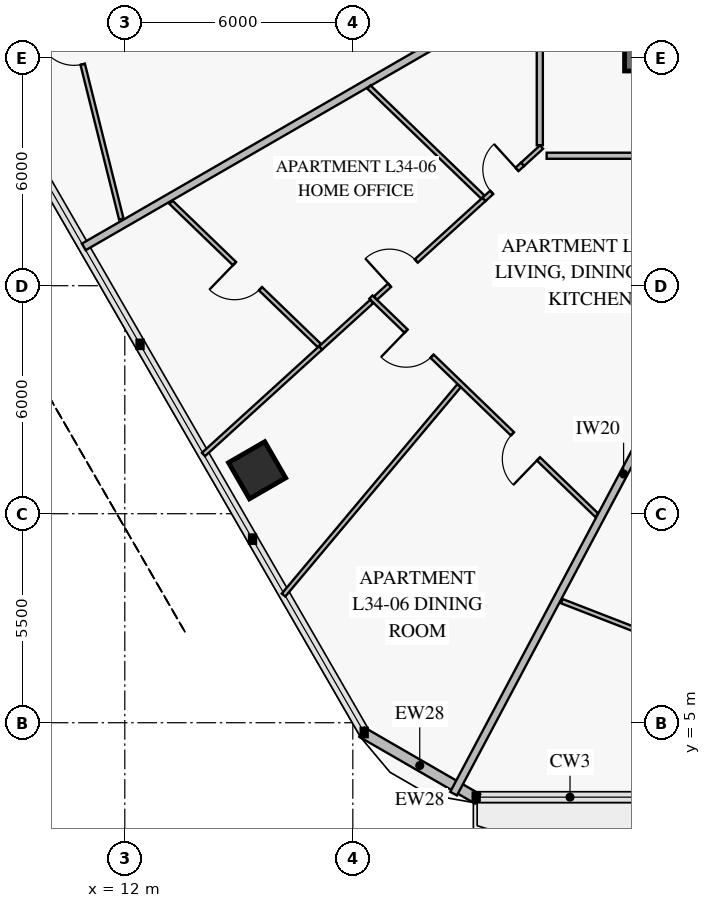
"""IFC4 building model, lengths in metres.
Left out: names, types, materials, properties, quantities, classifications, styles, units other than length and angle.
Written with IfcOpenShell. Run it as: python <this file> out.ifc"""

import sys

from ifc_helpers import new_model, si_unit, direction, frame, frame_2d, origin, origin_2d, place, context, subcontext, project, spatial, rectangle, extrude, element, fill, save


model = new_model("IFC4")
c1 = context("Model", 3, precision=1e-05, world=origin(), true_north=direction((0.0, 1.0)))
c2 = subcontext(c1, "Body", "Model", "MODEL_VIEW")
j1 = project(units=[si_unit("LENGTHUNIT", "METRE"), si_unit("PLANEANGLEUNIT", "RADIAN")], contexts=[c1])
p1 = place(None, origin())
s1 = spatial("IfcSite", under=j1, at=p1, CompositionType="ELEMENT")
p2 = place(p1, origin())
s2 = spatial("IfcBuilding", under=s1, at=p2, CompositionType="ELEMENT")
p3 = place(p2, frame((0.0, 0.0, 138.0)))
s3 = spatial("IfcBuildingStorey", under=s2, at=p3, CompositionType="ELEMENT", Elevation=138.0)
p4 = place(p3, frame((25.15, 22.5, 0.0), z_axis=(0.0, 0.0, 1.0), x_axis=(1.0, 0.0, 0.0)))
e1 = element("IfcWall", 1, at=p4, inside=s3, PredefinedType="SHEAR", context=c2, shape_type="SweptSolid", body=[
    extrude(rectangle(XDim=9.9, YDim=0.7, at=frame_2d((4.95, 0.0))), origin(), (0.0, 0.0, 1.0), 3.8),
])
p5 = place(p4, frame((4.25, 0.0, 0.0)))
e2 = element("IfcOpeningElement", 2, at=p5, cuts=e1, PredefinedType="OPENING", context=c2, shape_type="SweptSolid", body=[
    extrude(rectangle(XDim=1.5, YDim=2.15, at=frame_2d((0.75, 1.075))), frame((0.0, 0.362, 0.0), z_axis=(0.0, -1.0, 0.0), x_axis=(1.0, 0.0, 0.0)), (0.0, 0.0, 1.0), 0.724),
])
p6 = place(p3, frame((15.481, 11.643, 0.0), z_axis=(0.0, 0.0, 1.0), x_axis=(0.5, -0.866025403784, 0.0)))
e3 = element("IfcColumn", 3, at=p6, inside=s3, PredefinedType="COLUMN", context=c2, shape_type="SweptSolid", body=[
    extrude(rectangle(XDim=1.1, YDim=1.1, at=origin_2d()), origin(), (0.0, 0.0, 1.0), 3.55),
])
p7 = place(p3, frame((21.283, 2.994, 0.0), z_axis=(0.0, 0.0, 1.0), x_axis=(-0.866007452331, 0.500031091541, 0.0)))
e4 = element("IfcWall", 4, at=p7, inside=s3, PredefinedType="SOLIDWALL", context=c2, shape_type="SweptSolid", body=[
    extrude(rectangle(XDim=3.515, YDim=0.28, at=frame_2d((1.757, 0.0))), origin(), (0.0, 0.0, 1.0), 3.55),
])
p8 = place(p3, frame((9.688, 27.158, 0.0), z_axis=(0.0, 0.0, 1.0), x_axis=(0.241915844313, -0.970297235011, 0.0)))
e5 = element("IfcWall", 5, at=p8, inside=s3, PredefinedType="PARTITIONING", context=c2, shape_type="SweptSolid", body=[
    extrude(rectangle(XDim=9.177, YDim=0.12, at=frame_2d((4.588, 0.0))), origin(), (0.0, 0.0, 1.0), 2.85),
])
p9 = place(p8, frame((4.029, 0.0, 0.0)))
e6 = element("IfcOpeningElement", 6, at=p9, cuts=e5, PredefinedType="OPENING", context=c2, shape_type="SweptSolid", body=[
    extrude(rectangle(XDim=0.95, YDim=2.1, at=frame_2d((0.475, 1.05))), frame((0.0, 0.072, 0.0), z_axis=(0.0, -1.0, 0.0), x_axis=(1.0, 0.0, 0.0)), (0.0, 0.0, 1.0), 0.144),
])
p10 = place(p3, frame((18.475, 16.2, 0.0), z_axis=(0.0, 0.0, 1.0), x_axis=(0.719335270824, -0.694663060878, 0.0)))
e7 = element("IfcWall", 7, at=p10, inside=s3, PredefinedType="PARTITIONING", context=c2, shape_type="SweptSolid", body=[
    extrude(rectangle(XDim=8.263, YDim=0.12, at=frame_2d((4.131, 0.0))), origin(), (0.0, 0.0, 1.0), 2.85),
])
p11 = place(p10, frame((1.288, 0.0, 0.0)))
e8 = element("IfcOpeningElement", 8, at=p11, cuts=e7, PredefinedType="OPENING", context=c2, shape_type="SweptSolid", body=[
    extrude(rectangle(XDim=0.95, YDim=2.1, at=frame_2d((0.475, 1.05))), frame((0.0, 0.072, 0.0), z_axis=(0.0, -1.0, 0.0), x_axis=(1.0, 0.0, 0.0)), (0.0, 0.0, 1.0), 0.144),
])
p12 = place(p10, frame((5.179, 0.0, 0.0)))
e9 = element("IfcOpeningElement", 9, at=p12, cuts=e7, PredefinedType="OPENING", context=c2, shape_type="SweptSolid", body=[
    extrude(rectangle(XDim=0.95, YDim=2.1, at=frame_2d((0.475, 1.05))), frame((0.0, 0.072, 0.0), z_axis=(0.0, -1.0, 0.0), x_axis=(1.0, 0.0, 0.0)), (0.0, 0.0, 1.0), 0.144),
])
p13 = place(p3, frame((22.469, 19.696, 0.0), z_axis=(0.0, 0.0, 1.0), x_axis=(-0.739835725611, -0.672787558677, 0.0)))
e10 = element("IfcWall", 10, at=p13, inside=s3, PredefinedType="PARTITIONING", context=c2, shape_type="SweptSolid", body=[
    extrude(rectangle(XDim=1.376, YDim=0.12, at=frame_2d((0.688, 0.0))), origin(), (0.0, 0.0, 1.0), 3.55),
])
p14 = place(p13, frame((0.2, 0.0, 0.0)))
e11 = element("IfcOpeningElement", 11, at=p14, cuts=e10, PredefinedType="OPENING", context=c2, shape_type="SweptSolid", body=[
    extrude(rectangle(XDim=0.9, YDim=2.1, at=frame_2d((0.45, 1.05))), frame((0.0, 0.072, 0.0), z_axis=(0.0, -1.0, 0.0), x_axis=(1.0, 0.0, 0.0)), (0.0, 0.0, 1.0), 0.144),
])
p15 = place(p3, frame((21.45, 18.77, 0.0), z_axis=(0.0, 0.0, 1.0), x_axis=(-0.739899959551, -0.672716916583, 0.0)))
e12 = element("IfcWall", 12, at=p15, inside=s3, PredefinedType="PARTITIONING", context=c2, shape_type="SweptSolid", body=[
    extrude(rectangle(XDim=3.856, YDim=0.12, at=frame_2d((1.928, 0.0))), origin(), (0.0, 0.0, 1.0), 3.1),
])
p16 = place(p15, frame((2.406, 0.0, 0.0)))
e13 = element("IfcOpeningElement", 13, at=p16, cuts=e12, PredefinedType="OPENING", context=c2, shape_type="SweptSolid", body=[
    extrude(rectangle(XDim=0.95, YDim=2.1, at=frame_2d((0.475, 1.05))), frame((0.0, 0.072, 0.0), z_axis=(0.0, -1.0, 0.0), x_axis=(1.0, 0.0, 0.0)), (0.0, 0.0, 1.0), 0.144),
])
p17 = place(p3, frame((18.497, 16.084, 0.0), z_axis=(0.0, 0.0, 1.0), x_axis=(-0.739855068129, -0.672766287922, 0.0)))
e14 = element("IfcWall", 14, at=p17, inside=s3, PredefinedType="PARTITIONING", context=c2, shape_type="SweptSolid", body=[
    extrude(rectangle(XDim=1.82, YDim=0.12, at=frame_2d((0.91, 0.0))), origin(), (0.0, 0.0, 1.0), 3.55),
])
p18 = place(p3, frame((13.216, 18.695, 0.0), z_axis=(0.0, 0.0, 1.0), x_axis=(0.71932395173, -0.694674781799, 0.0)))
e15 = element("IfcWall", 15, at=p18, inside=s3, PredefinedType="PARTITIONING", context=c2, shape_type="SweptSolid", body=[
    extrude(rectangle(XDim=5.428, YDim=0.12, at=frame_2d((2.714, 0.0))), origin(), (0.0, 0.0, 1.0), 3.55),
])
p19 = place(p18, frame((2.323, 0.0, 0.0)))
e16 = element("IfcOpeningElement", 16, at=p19, cuts=e15, PredefinedType="OPENING", context=c2, shape_type="SweptSolid", body=[
    extrude(rectangle(XDim=0.95, YDim=2.1, at=frame_2d((0.475, 1.05))), frame((0.0, 0.072, 0.0), z_axis=(0.0, -1.0, 0.0), x_axis=(1.0, 0.0, 0.0)), (0.0, 0.0, 1.0), 0.144),
])
p20 = place(p3, frame((23.1, 19.92, 0.0), z_axis=(0.0, 0.0, 1.0), x_axis=(1.0, 0.0, 0.0)))
e17 = element("IfcWall", 17, at=p20, inside=s3, PredefinedType="PARTITIONING", context=c2, shape_type="SweptSolid", body=[
    extrude(rectangle(XDim=6.318, YDim=0.16, at=frame_2d((3.159, 0.0))), origin(), (0.0, 0.0, 1.0), 2.85),
])
p21 = place(p20, frame((2.634, 0.0, 0.0)))
e18 = element("IfcOpeningElement", 18, at=p21, cuts=e17, PredefinedType="OPENING", context=c2, shape_type="SweptSolid", body=[
    extrude(rectangle(XDim=1.05, YDim=2.15, at=frame_2d((0.525, 1.075))), frame((0.0, 0.092, 0.0), z_axis=(0.0, -1.0, 0.0), x_axis=(1.0, 0.0, 0.0)), (0.0, 0.0, 1.0), 0.184),
])
p22 = place(p3, frame((23.498, 8.199, 0.0), z_axis=(0.0, 0.0, 1.0), x_axis=(0.932323578893, -0.361625143262, 0.0)))
e19 = element("IfcWall", 19, at=p22, inside=s3, PredefinedType="PARTITIONING", context=c2, shape_type="SweptSolid", body=[
    extrude(rectangle(XDim=6.099, YDim=0.12, at=frame_2d((3.05, 0.0))), origin(), (0.0, 0.0, 1.0), 2.85),
])
p23 = place(p22, frame((2.574, 0.0, 0.0)))
e20 = element("IfcOpeningElement", 20, at=p23, cuts=e19, PredefinedType="OPENING", context=c2, shape_type="SweptSolid", body=[
    extrude(rectangle(XDim=0.95, YDim=2.1, at=frame_2d((0.475, 1.05))), frame((0.0, 0.072, 0.0), z_axis=(0.0, -1.0, 0.0), x_axis=(1.0, 0.0, 0.0)), (0.0, 0.0, 1.0), 0.144),
])
p24 = place(p3, frame((22.96, 24.471, 0.0), z_axis=(0.0, 0.0, 1.0), x_axis=(-0.866023267778, -0.500003699654, 0.0)))
e21 = element("IfcWall", 21, at=p24, inside=s3, PredefinedType="PARTITIONING", context=c2, shape_type="SweptSolid", body=[
    extrude(rectangle(XDim=13.901, YDim=0.2, at=frame_2d((6.951, 0.0))), origin(), (0.0, 0.0, 1.0), 2.8),
])
p25 = place(p3, frame((20.794, 13.866, 0.0), z_axis=(0.0, 0.0, 1.0), x_axis=(-0.642520269692, -0.766268688539, 0.0)))
e22 = element("IfcWall", 22, at=p25, inside=s3, PredefinedType="PARTITIONING", context=c2, shape_type="SweptSolid", body=[
    extrude(rectangle(XDim=7.187, YDim=0.12, at=frame_2d((3.594, 0.0))), origin(), (0.0, 0.0, 1.0), 2.8),
])
p26 = place(p3, frame((22.965, 20.147, 0.0), z_axis=(0.0, 0.0, 1.0), x_axis=(-0.739791864243, -0.67283578799, 0.0)))
e23 = element("IfcWall", 23, at=p26, inside=s3, PredefinedType="PARTITIONING", context=c2, shape_type="SweptSolid", body=[
    extrude(rectangle(XDim=0.671, YDim=0.12, at=frame_2d((0.335, 0.0))), origin(), (0.0, 0.0, 1.0), 3.55),
])
p27 = place(p3, frame((17.151, 14.86, 0.0), z_axis=(0.0, 0.0, 1.0), x_axis=(-0.739873749573, -0.672745742976, 0.0)))
e24 = element("IfcWall", 24, at=p27, inside=s3, PredefinedType="PARTITIONING", context=c2, shape_type="SweptSolid", body=[
    extrude(rectangle(XDim=4.164, YDim=0.12, at=frame_2d((2.082, 0.0))), origin(), (0.0, 0.0, 1.0), 2.8),
])
p28 = place(p3, frame((18.424, 21.728, 0.0), z_axis=(0.0, 0.0, 1.0), x_axis=(0.719336822734, -0.694661453845, 0.0)))
e25 = element("IfcWall", 25, at=p28, inside=s3, PredefinedType="PARTITIONING", context=c2, shape_type="SweptSolid", body=[
    extrude(rectangle(XDim=4.166, YDim=0.12, at=frame_2d((2.083, 0.0))), origin(), (0.0, 0.0, 1.0), 3.55),
])
p29 = place(p3, frame((29.598, 19.96, 0.0), z_axis=(0.0, 0.0, 1.0), x_axis=(-0.469467427619, -0.882949791554, 0.0)))
e26 = element("IfcWall", 26, at=p29, inside=s3, PredefinedType="PARTITIONING", context=c2, shape_type="SweptSolid", body=[
    extrude(rectangle(XDim=19.057, YDim=0.2, at=frame_2d((9.528, 0.0))), origin(), (0.0, 0.0, 1.0), 2.8),
])
p30 = place(p3, frame((22.92, 24.272, 0.0), z_axis=(0.0, 0.0, 1.0), x_axis=(0.0, -1.0, 0.0)))
e27 = element("IfcWall", 27, at=p30, inside=s3, PredefinedType="PARTITIONING", context=c2, shape_type="SweptSolid", body=[
    extrude(rectangle(XDim=4.075, YDim=0.16, at=frame_2d((2.038, 0.0))), origin(), (0.0, 0.0, 1.0), 3.55),
])
p31 = place(p9, frame((0.95, 0.0, 0.0), z_axis=(0.0, 0.0, 1.0), x_axis=(-1.0, 0.0, 0.0)))
e28 = element("IfcDoor", 28, at=p31, inside=s3, OperationType="SINGLE_SWING_RIGHT", PredefinedType="DOOR", context=c2, shape_type="SweptSolid", body=[
    extrude(rectangle(XDim=0.95, YDim=2.1, at=frame_2d((0.475, 1.05))), frame((0.0, 0.025, 0.0), z_axis=(0.0, -1.0, 0.0), x_axis=(1.0, 0.0, 0.0)), (0.0, 0.0, 1.0), 0.05),
])
fill(e6, e28)
p32 = place(p11, frame((0.95, 0.0, 0.0), z_axis=(0.0, 0.0, 1.0), x_axis=(-1.0, 0.0, 0.0)))
e29 = element("IfcDoor", 29, at=p32, inside=s3, OperationType="SINGLE_SWING_RIGHT", PredefinedType="DOOR", context=c2, shape_type="SweptSolid", body=[
    extrude(rectangle(XDim=0.95, YDim=2.1, at=frame_2d((0.475, 1.05))), frame((0.0, 0.025, 0.0), z_axis=(0.0, -1.0, 0.0), x_axis=(1.0, 0.0, 0.0)), (0.0, 0.0, 1.0), 0.05),
])
fill(e8, e29)
p33 = place(p12, frame((0.95, 0.0, 0.0), z_axis=(0.0, 0.0, 1.0), x_axis=(-1.0, 0.0, 0.0)))
e30 = element("IfcDoor", 30, at=p33, inside=s3, OperationType="SINGLE_SWING_LEFT", PredefinedType="DOOR", context=c2, shape_type="SweptSolid", body=[
    extrude(rectangle(XDim=0.95, YDim=2.1, at=frame_2d((0.475, 1.05))), frame((0.0, 0.025, 0.0), z_axis=(0.0, -1.0, 0.0), x_axis=(1.0, 0.0, 0.0)), (0.0, 0.0, 1.0), 0.05),
])
fill(e9, e30)
p34 = place(p14, frame((0.9, 0.0, 0.0), z_axis=(0.0, 0.0, 1.0), x_axis=(-1.0, 0.0, 0.0)))
e31 = element("IfcDoor", 31, at=p34, inside=s3, OperationType="SINGLE_SWING_RIGHT", PredefinedType="DOOR", context=c2, shape_type="SweptSolid", body=[
    extrude(rectangle(XDim=0.9, YDim=2.1, at=frame_2d((0.45, 1.05))), frame((0.0, 0.025, 0.0), z_axis=(0.0, -1.0, 0.0), x_axis=(1.0, 0.0, 0.0)), (0.0, 0.0, 1.0), 0.05),
])
fill(e11, e31)
p35 = place(p16, frame((0.95, 0.0, 0.0), z_axis=(0.0, 0.0, 1.0), x_axis=(-1.0, 0.0, 0.0)))
e32 = element("IfcDoor", 32, at=p35, inside=s3, OperationType="SINGLE_SWING_LEFT", PredefinedType="DOOR", context=c2, shape_type="SweptSolid", body=[
    extrude(rectangle(XDim=0.95, YDim=2.1, at=frame_2d((0.475, 1.05))), frame((0.0, 0.025, 0.0), z_axis=(0.0, -1.0, 0.0), x_axis=(1.0, 0.0, 0.0)), (0.0, 0.0, 1.0), 0.05),
])
fill(e13, e32)
p36 = place(p19, frame((0.95, 0.0, 0.0), z_axis=(0.0, 0.0, 1.0), x_axis=(-1.0, 0.0, 0.0)))
e33 = element("IfcDoor", 33, at=p36, inside=s3, OperationType="SINGLE_SWING_RIGHT", PredefinedType="DOOR", context=c2, shape_type="SweptSolid", body=[
    extrude(rectangle(XDim=0.95, YDim=2.1, at=frame_2d((0.475, 1.05))), frame((0.0, 0.025, 0.0), z_axis=(0.0, -1.0, 0.0), x_axis=(1.0, 0.0, 0.0)), (0.0, 0.0, 1.0), 0.05),
])
fill(e16, e33)
save(model, sys.argv[1])
